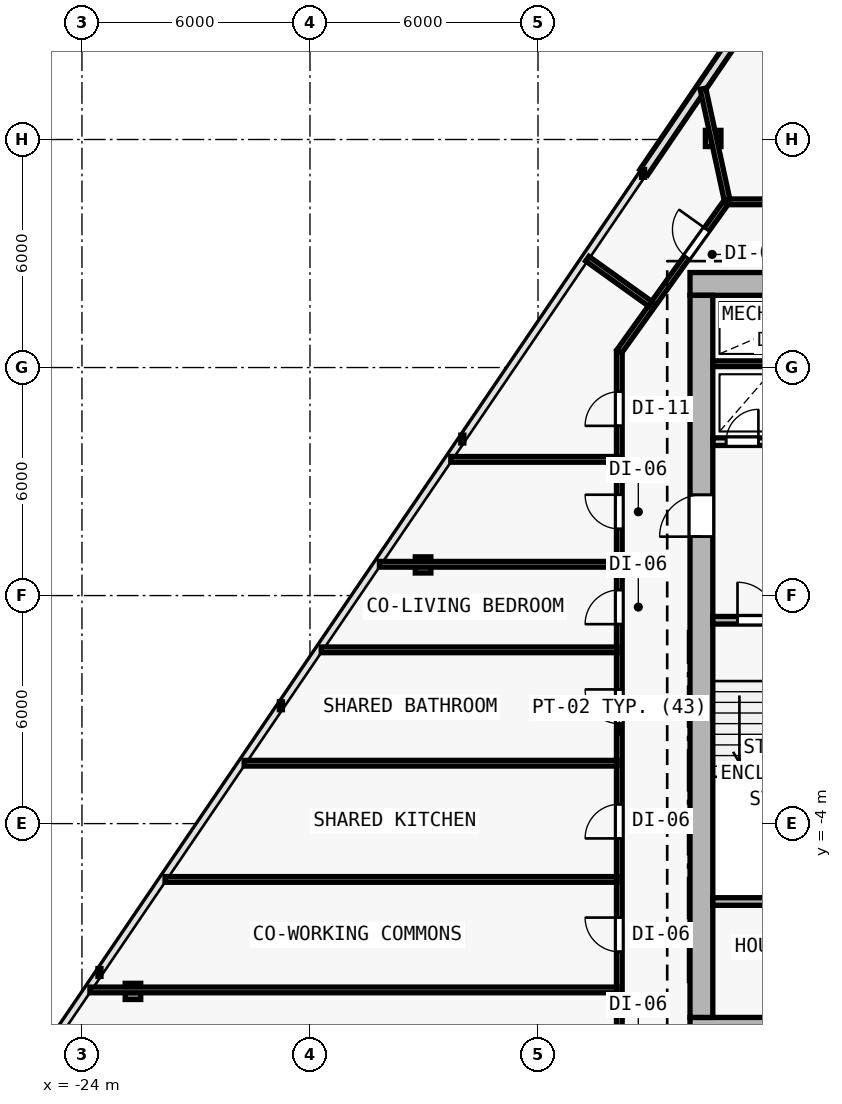
"""IFC4 building model, lengths in metres.
Left out: names, types, materials, properties, quantities, classifications, styles, units other than length and angle.
Written with IfcOpenShell. Run it as: python <this file> out.ifc"""

import sys

from ifc_helpers import new_model, si_unit, direction, frame, frame_2d, origin, origin_2d, place, context, subcontext, project, spatial, rectangle, i_section, extrude, element, fill, save


model = new_model("IFC4")
c1 = context("Model", 3, precision=1e-05, world=origin(), true_north=direction((0.0, 1.0)))
c2 = subcontext(c1, "Body", "Model", "MODEL_VIEW")
j1 = project(units=[si_unit("LENGTHUNIT", "METRE"), si_unit("PLANEANGLEUNIT", "RADIAN")], contexts=[c1])
p1 = place(None, origin())
s1 = spatial("IfcSite", under=j1, at=p1, CompositionType="ELEMENT")
p2 = place(p1, origin())
s2 = spatial("IfcBuilding", under=s1, at=p2, CompositionType="ELEMENT")
p3 = place(p2, frame((0.0, 0.0, 96.9)))
s3 = spatial("IfcBuildingStorey", under=s2, at=p3, CompositionType="ELEMENT", Elevation=96.9)
for number, where, z_axis, x_axis in (
    (1, (-7.7, -9.4, 0.0), (0.0, 0.0, 1.0), (1.0, 0.0, 0.0)),
    (2, (-7.7, 10.2, 0.0), (0.0, 0.0, 1.0), (1.0, 0.0, 0.0)),
    (3, (-7.7, 2.0, 0.0), (0.0, 0.0, 1.0), (1.0, 0.0, 0.0)),
):
    element("IfcColumn", number, at=place(p3, frame(where, z_axis=z_axis, x_axis=x_axis)), inside=s3, PredefinedType="COLUMN", context=c2, shape_type="SweptSolid", body=[
        extrude(i_section(OverallWidth=0.409, OverallDepth=0.425, WebThickness=0.021, FlangeThickness=0.034, FilletRadius=0.015, at=origin_2d()), origin(), (0.0, 0.0, 1.0), 3.6),
    ])
p4 = place(p3, frame((-7.39, 14.028, 0.006), z_axis=(0.008843163607, -0.002516900411, 0.999957730942), x_axis=(0.273743828055, 0.961802639112, 0.0)))
e4 = element("IfcColumn", 4, at=p4, inside=s3, PredefinedType="COLUMN", context=c2, shape_type="SweptSolid", body=[
    extrude(i_section(OverallWidth=0.409, OverallDepth=0.425, WebThickness=0.021, FlangeThickness=0.034, FilletRadius=0.015, at=origin_2d()), origin(), (0.0, 0.0, 1.0), 3.589),
])
p5 = place(p3, frame((-15.024, 2.806, 0.006), z_axis=(0.017071567417, 0.009521989794, 0.999808928394), x_axis=(-0.487119351792, 0.873335409284, 0.0)))
e5 = element("IfcColumn", 5, at=p5, inside=s3, PredefinedType="COLUMN", context=c2, shape_type="SweptSolid", body=[
    extrude(i_section(OverallWidth=0.409, OverallDepth=0.425, WebThickness=0.021, FlangeThickness=0.034, FilletRadius=0.015, at=origin_2d()), origin(), (0.0, 0.0, 1.0), 3.59),
])
p6 = place(p3, frame((-22.658, -8.415, 0.006), z_axis=(0.025292109804, 0.02162067451, 0.999446274502), x_axis=(-0.649781149204, 0.760121344352, 0.0)))
e6 = element("IfcColumn", 6, at=p6, inside=s3, PredefinedType="COLUMN", context=c2, shape_type="SweptSolid", body=[
    extrude(i_section(OverallWidth=0.409, OverallDepth=0.425, WebThickness=0.021, FlangeThickness=0.034, FilletRadius=0.015, at=origin_2d()), origin(), (0.0, 0.0, 1.0), 3.591),
])
p7 = place(p3, frame((-9.217, 13.136, 0.0), z_axis=(0.0, 0.0, 1.0), x_axis=(0.562468998305, 0.826818375428, 0.0)))
e7 = element("IfcWall", 7, at=p7, inside=s3, PredefinedType="SOLIDWALL", context=c2, shape_type="SweptSolid", body=[
    extrude(rectangle(XDim=11.929, YDim=0.25, at=frame_2d((5.964, 0.0))), origin(), (0.0, 0.0, 1.0), 3.35),
])
p8 = place(p7, frame((5.364, 0.0, 0.62)))
e8 = element("IfcOpeningElement", 8, at=p8, cuts=e7, PredefinedType="OPENING", context=c2, shape_type="SweptSolid", body=[
    extrude(rectangle(XDim=1.2, YDim=1.8, at=frame_2d((0.6, 0.9))), frame((0.0, 0.135, 0.0), z_axis=(0.0, -1.0, 0.0), x_axis=(1.0, 0.0, 0.0)), (0.0, 0.0, 1.0), 0.27),
])
p9 = place(p3, frame((-8.0, -9.4, 0.0), z_axis=(0.0, 0.0, 1.0), x_axis=(1.0, 0.0, 0.0)))
e9 = element("IfcWall", 9, at=p9, inside=s3, PredefinedType="SHEAR", context=c2, shape_type="SweptSolid", body=[
    extrude(rectangle(XDim=16.0, YDim=0.6, at=frame_2d((8.0, 0.0))), origin(), (0.0, 0.0, 1.0), 3.35),
])
p10 = place(p9, frame((9.65, 0.0, 0.0)))
e10 = element("IfcOpeningElement", 10, at=p10, cuts=e9, PredefinedType="OPENING", context=c2, shape_type="SweptSolid", body=[
    extrude(rectangle(XDim=1.5, YDim=2.2, at=frame_2d((0.75, 1.1))), frame((0.0, 0.31, 0.0), z_axis=(0.0, -1.0, 0.0), x_axis=(1.0, 0.0, 0.0)), (0.0, 0.0, 1.0), 0.62),
])
p11 = place(p3, frame((8.0, 10.2, 0.0), z_axis=(0.0, 0.0, 1.0), x_axis=(-1.0, 0.0, 0.0)))
e11 = element("IfcWall", 11, at=p11, inside=s3, PredefinedType="SHEAR", context=c2, shape_type="SweptSolid", body=[
    extrude(rectangle(XDim=16.0, YDim=0.6, at=frame_2d((8.0, 0.0))), origin(), (0.0, 0.0, 1.0), 3.35),
])
p12 = place(p11, frame((4.45, 0.0, 0.0)))
e12 = element("IfcOpeningElement", 12, at=p12, cuts=e11, PredefinedType="OPENING", context=c2, shape_type="SweptSolid", body=[
    extrude(rectangle(XDim=1.1, YDim=2.15, at=frame_2d((0.55, 1.075))), frame((0.0, 0.31, 0.0), z_axis=(0.0, -1.0, 0.0), x_axis=(1.0, 0.0, 0.0)), (0.0, 0.0, 1.0), 0.62),
])
p13 = place(p3, frame((-7.7, -9.1, 0.0), z_axis=(0.0, 0.0, 1.0), x_axis=(0.0, 1.0, 0.0)))
e13 = element("IfcWall", 13, at=p13, inside=s3, PredefinedType="SHEAR", context=c2, shape_type="SweptSolid", body=[
    extrude(rectangle(XDim=19.0, YDim=0.6, at=frame_2d((9.5, 0.0))), origin(), (0.0, 0.0, 1.0), 3.35),
])
p14 = place(p13, frame((12.65, 0.0, 0.0)))
e14 = element("IfcOpeningElement", 14, at=p14, cuts=e13, PredefinedType="OPENING", context=c2, shape_type="SweptSolid", body=[
    extrude(rectangle(XDim=1.1, YDim=2.15, at=frame_2d((0.55, 1.075))), frame((0.0, 0.31, 0.0), z_axis=(0.0, -1.0, 0.0), x_axis=(1.0, 0.0, 0.0)), (0.0, 0.0, 1.0), 0.62),
])
p15 = place(p3, frame((-7.4, 1.35, 0.0), z_axis=(0.0, 0.0, 1.0), x_axis=(1.0, 0.0, 0.0)))
e15 = element("IfcWall", 15, at=p15, inside=s3, PredefinedType="SOLIDWALL", context=c2, shape_type="SweptSolid", body=[
    extrude(rectangle(XDim=3.35, YDim=0.2, at=frame_2d((1.675, 0.0))), origin(), (0.0, 0.0, 1.0), 3.35),
])
p16 = place(p15, frame((0.65, 0.0, 0.0)))
e16 = element("IfcOpeningElement", 16, at=p16, cuts=e15, PredefinedType="OPENING", context=c2, shape_type="SweptSolid", body=[
    extrude(rectangle(XDim=1.0, YDim=2.15, at=frame_2d((0.5, 1.075))), frame((0.0, 0.11, 0.0), z_axis=(0.0, -1.0, 0.0), x_axis=(1.0, 0.0, 0.0)), (0.0, 0.0, 1.0), 0.22),
])
p17 = place(p3, frame((-7.395, 6.05, 0.0), z_axis=(0.0, 0.0, 1.0), x_axis=(1.0, 0.0, 0.0)))
e17 = element("IfcWall", 17, at=p17, inside=s3, PredefinedType="SOLIDWALL", context=c2, shape_type="SweptSolid", body=[
    extrude(rectangle(XDim=3.545, YDim=0.2, at=frame_2d((1.772, 0.0))), origin(), (0.0, 0.0, 1.0), 3.35),
])
p18 = place(p17, frame((0.345, 0.0, 0.0)))
e18 = element("IfcOpeningElement", 18, at=p18, cuts=e17, PredefinedType="OPENING", context=c2, shape_type="SweptSolid", body=[
    extrude(rectangle(XDim=0.85, YDim=2.1, at=frame_2d((0.425, 1.05))), frame((0.0, 0.11, 0.0), z_axis=(0.0, -1.0, 0.0), x_axis=(1.0, 0.0, 0.0)), (0.0, 0.0, 1.0), 0.22),
])
p19 = place(p17, frame((2.145, 0.0, 0.0)))
e19 = element("IfcOpeningElement", 19, at=p19, cuts=e17, PredefinedType="OPENING", context=c2, shape_type="SweptSolid", body=[
    extrude(rectangle(XDim=0.85, YDim=2.1, at=frame_2d((0.425, 1.05))), frame((0.0, 0.11, 0.0), z_axis=(0.0, -1.0, 0.0), x_axis=(1.0, 0.0, 0.0)), (0.0, 0.0, 1.0), 0.22),
])
p20 = place(p3, frame((-7.395, 8.1, 0.0), z_axis=(0.0, 0.0, 1.0), x_axis=(1.0, 0.0, 0.0)))
e20 = element("IfcWall", 20, at=p20, inside=s3, PredefinedType="PARTITIONING", context=c2, shape_type="SweptSolid", body=[
    extrude(rectangle(XDim=3.545, YDim=0.15, at=frame_2d((1.772, 0.0))), origin(), (0.0, 0.0, 1.0), 3.35),
])
p21 = place(p3, frame((-7.4, -6.05, 0.0), z_axis=(0.0, 0.0, 1.0), x_axis=(1.0, 0.0, 0.0)))
e21 = element("IfcWall", 21, at=p21, inside=s3, PredefinedType="SOLIDWALL", context=c2, shape_type="SweptSolid", body=[
    extrude(rectangle(XDim=3.35, YDim=0.2, at=frame_2d((1.675, 0.0))), origin(), (0.0, 0.0, 1.0), 3.35),
])
p22 = place(p3, frame((-9.86, -11.56, 0.0), z_axis=(0.0, 0.0, 1.0), x_axis=(0.0, 1.0, 0.0)))
e22 = element("IfcWall", 22, at=p22, inside=s3, PredefinedType="PARTITIONING", context=c2, shape_type="SweptSolid", body=[
    extrude(rectangle(XDim=19.986, YDim=0.15, at=frame_2d((9.993, 0.0))), origin(), (0.0, 0.0, 1.0), 2.705),
])
p23 = place(p22, frame((10.19, 0.0, 0.0)))
e23 = element("IfcOpeningElement", 23, at=p23, cuts=e22, PredefinedType="OPENING", context=c2, shape_type="SweptSolid", body=[
    extrude(rectangle(XDim=0.9, YDim=2.1, at=frame_2d((0.45, 1.05))), frame((0.0, 0.085, 0.0), z_axis=(0.0, -1.0, 0.0), x_axis=(1.0, 0.0, 0.0)), (0.0, 0.0, 1.0), 0.17),
])
p24 = place(p22, frame((7.17, 0.0, 0.0)))
e24 = element("IfcOpeningElement", 24, at=p24, cuts=e22, PredefinedType="OPENING", context=c2, shape_type="SweptSolid", body=[
    extrude(rectangle(XDim=0.9, YDim=2.1, at=frame_2d((0.45, 1.05))), frame((0.0, 0.085, 0.0), z_axis=(0.0, -1.0, 0.0), x_axis=(1.0, 0.0, 0.0)), (0.0, 0.0, 1.0), 0.17),
])
p25 = place(p22, frame((4.187, 0.0, 0.0)))
e25 = element("IfcOpeningElement", 25, at=p25, cuts=e22, PredefinedType="OPENING", context=c2, shape_type="SweptSolid", body=[
    extrude(rectangle(XDim=0.9, YDim=2.1, at=frame_2d((0.45, 1.05))), frame((0.0, 0.085, 0.0), z_axis=(0.0, -1.0, 0.0), x_axis=(1.0, 0.0, 0.0)), (0.0, 0.0, 1.0), 0.17),
])
p26 = place(p22, frame((1.231, 0.0, 0.0)))
e26 = element("IfcOpeningElement", 26, at=p26, cuts=e22, PredefinedType="OPENING", context=c2, shape_type="SweptSolid", body=[
    extrude(rectangle(XDim=0.9, YDim=2.1, at=frame_2d((0.45, 1.05))), frame((0.0, 0.085, 0.0), z_axis=(0.0, -1.0, 0.0), x_axis=(1.0, 0.0, 0.0)), (0.0, 0.0, 1.0), 0.17),
])
p27 = place(p22, frame((18.026, 0.0, 0.0)))
e27 = element("IfcOpeningElement", 27, at=p27, cuts=e22, PredefinedType="OPENING", context=c2, shape_type="SweptSolid", body=[
    extrude(rectangle(XDim=0.9, YDim=2.1, at=frame_2d((0.45, 1.05))), frame((0.0, 0.085, 0.0), z_axis=(0.0, -1.0, 0.0), x_axis=(1.0, 0.0, 0.0)), (0.0, 0.0, 1.0), 0.17),
])
p28 = place(p22, frame((15.313, 0.0, 0.0)))
e28 = element("IfcOpeningElement", 28, at=p28, cuts=e22, PredefinedType="OPENING", context=c2, shape_type="SweptSolid", body=[
    extrude(rectangle(XDim=0.9, YDim=2.1, at=frame_2d((0.45, 1.05))), frame((0.0, 0.085, 0.0), z_axis=(0.0, -1.0, 0.0), x_axis=(1.0, 0.0, 0.0)), (0.0, 0.0, 1.0), 0.17),
])
p29 = place(p22, frame((12.808, 0.0, 0.0)))
e29 = element("IfcOpeningElement", 29, at=p29, cuts=e22, PredefinedType="OPENING", context=c2, shape_type="SweptSolid", body=[
    extrude(rectangle(XDim=0.9, YDim=2.1, at=frame_2d((0.45, 1.05))), frame((0.0, 0.085, 0.0), z_axis=(0.0, -1.0, 0.0), x_axis=(1.0, 0.0, 0.0)), (0.0, 0.0, 1.0), 0.17),
])
p30 = place(p3, frame((-9.86, 8.426, 0.0), z_axis=(0.0, 0.0, 1.0), x_axis=(0.582449511476, 0.812866881218, 0.0)))
e30 = element("IfcWall", 30, at=p30, inside=s3, PredefinedType="PARTITIONING", context=c2, shape_type="SweptSolid", body=[
    extrude(rectangle(XDim=4.84, YDim=0.15, at=frame_2d((2.42, 0.0))), origin(), (0.0, 0.0, 1.0), 2.925),
])
p31 = place(p30, frame((3.046, 0.0, 0.0)))
e31 = element("IfcOpeningElement", 31, at=p31, cuts=e30, PredefinedType="OPENING", context=c2, shape_type="SweptSolid", body=[
    extrude(rectangle(XDim=0.9, YDim=2.1, at=frame_2d((0.45, 1.05))), frame((0.0, 0.085, 0.0), z_axis=(0.0, -1.0, 0.0), x_axis=(1.0, 0.0, 0.0)), (0.0, 0.0, 1.0), 0.17),
])
p32 = place(p3, frame((-7.041, 12.36, 0.0), z_axis=(0.0, 0.0, 1.0), x_axis=(1.0, 0.0, 0.0)))
e32 = element("IfcWall", 32, at=p32, inside=s3, PredefinedType="PARTITIONING", context=c2, shape_type="SweptSolid", body=[
    extrude(rectangle(XDim=14.082, YDim=0.15, at=frame_2d((7.041, 0.0))), origin(), (0.0, 0.0, 1.0), 3.35),
])
p33 = place(p32, frame((4.28, 0.0, 0.0)))
e33 = element("IfcOpeningElement", 33, at=p33, cuts=e32, PredefinedType="OPENING", context=c2, shape_type="SweptSolid", body=[
    extrude(rectangle(XDim=0.9, YDim=2.1, at=frame_2d((0.45, 1.05))), frame((0.0, 0.085, 0.0), z_axis=(0.0, -1.0, 0.0), x_axis=(1.0, 0.0, 0.0)), (0.0, 0.0, 1.0), 0.17),
])
p34 = place(p3, frame((-7.026, 12.417, 0.0), z_axis=(0.0, 0.0, 1.0), x_axis=(-0.211883427843, 0.977294946782, 0.0)))
e34 = element("IfcWall", 34, at=p34, inside=s3, PredefinedType="PARTITIONING", context=c2, shape_type="SweptSolid", body=[
    extrude(rectangle(XDim=2.988, YDim=0.15, at=frame_2d((1.494, 0.0))), origin(), (0.0, 0.0, 1.0), 2.835),
])
p35 = place(p3, frame((-9.92, 2.823, 0.0), z_axis=(0.0, 0.0, 1.0), x_axis=(-1.0, 0.0, 0.0)))
e35 = element("IfcWall", 35, at=p35, inside=s3, PredefinedType="PARTITIONING", context=c2, shape_type="SweptSolid", body=[
    extrude(rectangle(XDim=6.252, YDim=0.15, at=frame_2d((3.126, 0.0))), origin(), (0.0, 0.0, 1.0), 2.835),
])
p36 = place(p3, frame((-9.92, -8.376, 0.0), z_axis=(0.0, 0.0, 1.0), x_axis=(-1.0, 0.0, 0.0)))
e36 = element("IfcWall", 36, at=p36, inside=s3, PredefinedType="PARTITIONING", context=c2, shape_type="SweptSolid", body=[
    extrude(rectangle(XDim=13.871, YDim=0.15, at=frame_2d((6.936, 0.0))), origin(), (0.0, 0.0, 1.0), 2.705),
])
p37 = place(p3, frame((-9.92, -2.411, 0.0), z_axis=(0.0, 0.0, 1.0), x_axis=(-1.0, 0.0, 0.0)))
e37 = element("IfcWall", 37, at=p37, inside=s3, PredefinedType="PARTITIONING", context=c2, shape_type="SweptSolid", body=[
    extrude(rectangle(XDim=9.813, YDim=0.15, at=frame_2d((4.906, 0.0))), origin(), (0.0, 0.0, 1.0), 2.725),
])
p38 = place(p3, frame((-9.041, 9.673, 0.0), z_axis=(0.0, 0.0, 1.0), x_axis=(-0.812933955931, 0.582355890581, 0.0)))
e38 = element("IfcWall", 38, at=p38, inside=s3, PredefinedType="PARTITIONING", context=c2, shape_type="SweptSolid", body=[
    extrude(rectangle(XDim=2.045, YDim=0.15, at=frame_2d((1.022, 0.0))), origin(), (0.0, 0.0, 1.0), 2.835),
])
p39 = place(p3, frame((-9.92, 0.572, 0.0), z_axis=(0.0, 0.0, 1.0), x_axis=(-1.0, 0.0, 0.0)))
e39 = element("IfcWall", 39, at=p39, inside=s3, PredefinedType="PARTITIONING", context=c2, shape_type="SweptSolid", body=[
    extrude(rectangle(XDim=7.784, YDim=0.15, at=frame_2d((3.892, 0.0))), origin(), (0.0, 0.0, 1.0), 2.725),
])
p40 = place(p3, frame((-9.92, -5.469, 0.0), z_axis=(0.0, 0.0, 1.0), x_axis=(-1.0, 0.0, 0.0)))
e40 = element("IfcWall", 40, at=p40, inside=s3, PredefinedType="PARTITIONING", context=c2, shape_type="SweptSolid", body=[
    extrude(rectangle(XDim=11.894, YDim=0.15, at=frame_2d((5.947, 0.0))), origin(), (0.0, 0.0, 1.0), 2.725),
])
p41 = place(p3, frame((-9.92, 5.584, 0.0), z_axis=(0.0, 0.0, 1.0), x_axis=(-1.0, 0.0, 0.0)))
e41 = element("IfcWall", 41, at=p41, inside=s3, PredefinedType="PARTITIONING", context=c2, shape_type="SweptSolid", body=[
    extrude(rectangle(XDim=4.374, YDim=0.15, at=frame_2d((2.187, 0.0))), origin(), (0.0, 0.0, 1.0), 2.835),
])
p42 = place(p14, origin())
e42 = element("IfcDoor", 42, at=p42, inside=s3, OperationType="SINGLE_SWING_LEFT", PredefinedType="DOOR", context=c2, shape_type="SweptSolid", body=[
    extrude(rectangle(XDim=1.1, YDim=2.15, at=frame_2d((0.55, 1.075))), frame((0.0, 0.025, 0.0), z_axis=(0.0, -1.0, 0.0), x_axis=(1.0, 0.0, 0.0)), (0.0, 0.0, 1.0), 0.05),
])
fill(e14, e42)
p43 = place(p16, origin())
e43 = element("IfcDoor", 43, at=p43, inside=s3, OperationType="SINGLE_SWING_LEFT", PredefinedType="DOOR", context=c2, shape_type="SweptSolid", body=[
    extrude(rectangle(XDim=1.0, YDim=2.15, at=frame_2d((0.5, 1.075))), frame((0.0, 0.025, 0.0), z_axis=(0.0, -1.0, 0.0), x_axis=(1.0, 0.0, 0.0)), (0.0, 0.0, 1.0), 0.05),
])
fill(e16, e43)
p44 = place(p18, origin())
e44 = element("IfcDoor", 44, at=p44, inside=s3, OperationType="SINGLE_SWING_RIGHT", PredefinedType="DOOR", context=c2, shape_type="SweptSolid", body=[
    extrude(rectangle(XDim=0.85, YDim=2.1, at=frame_2d((0.425, 1.05))), frame((0.0, 0.025, 0.0), z_axis=(0.0, -1.0, 0.0), x_axis=(1.0, 0.0, 0.0)), (0.0, 0.0, 1.0), 0.05),
])
fill(e18, e44)
p45 = place(p23, origin())
e45 = element("IfcDoor", 45, at=p45, inside=s3, OperationType="SINGLE_SWING_RIGHT", PredefinedType="DOOR", context=c2, shape_type="SweptSolid", body=[
    extrude(rectangle(XDim=0.9, YDim=2.1, at=frame_2d((0.45, 1.05))), frame((0.0, 0.025, 0.0), z_axis=(0.0, -1.0, 0.0), x_axis=(1.0, 0.0, 0.0)), (0.0, 0.0, 1.0), 0.05),
])
fill(e23, e45)
p46 = place(p24, origin())
e46 = element("IfcDoor", 46, at=p46, inside=s3, OperationType="SINGLE_SWING_LEFT", PredefinedType="DOOR", context=c2, shape_type="SweptSolid", body=[
    extrude(rectangle(XDim=0.9, YDim=2.1, at=frame_2d((0.45, 1.05))), frame((0.0, 0.025, 0.0), z_axis=(0.0, -1.0, 0.0), x_axis=(1.0, 0.0, 0.0)), (0.0, 0.0, 1.0), 0.05),
])
fill(e24, e46)
p47 = place(p25, origin())
e47 = element("IfcDoor", 47, at=p47, inside=s3, OperationType="SINGLE_SWING_RIGHT", PredefinedType="DOOR", context=c2, shape_type="SweptSolid", body=[
    extrude(rectangle(XDim=0.9, YDim=2.1, at=frame_2d((0.45, 1.05))), frame((0.0, 0.025, 0.0), z_axis=(0.0, -1.0, 0.0), x_axis=(1.0, 0.0, 0.0)), (0.0, 0.0, 1.0), 0.05),
])
fill(e25, e47)
p48 = place(p31, origin())
e48 = element("IfcDoor", 48, at=p48, inside=s3, OperationType="SINGLE_SWING_RIGHT", PredefinedType="DOOR", context=c2, shape_type="SweptSolid", body=[
    extrude(rectangle(XDim=0.9, YDim=2.1, at=frame_2d((0.45, 1.05))), frame((0.0, 0.025, 0.0), z_axis=(0.0, -1.0, 0.0), x_axis=(1.0, 0.0, 0.0)), (0.0, 0.0, 1.0), 0.05),
])
fill(e31, e48)
p49 = place(p27, origin())
e49 = element("IfcDoor", 49, at=p49, inside=s3, OperationType="SINGLE_SWING_LEFT", PredefinedType="DOOR", context=c2, shape_type="SweptSolid", body=[
    extrude(rectangle(XDim=0.9, YDim=2.1, at=frame_2d((0.45, 1.05))), frame((0.0, 0.025, 0.0), z_axis=(0.0, -1.0, 0.0), x_axis=(1.0, 0.0, 0.0)), (0.0, 0.0, 1.0), 0.05),
])
fill(e27, e49)
p50 = place(p28, origin())
e50 = element("IfcDoor", 50, at=p50, inside=s3, OperationType="SINGLE_SWING_RIGHT", PredefinedType="DOOR", context=c2, shape_type="SweptSolid", body=[
    extrude(rectangle(XDim=0.9, YDim=2.1, at=frame_2d((0.45, 1.05))), frame((0.0, 0.025, 0.0), z_axis=(0.0, -1.0, 0.0), x_axis=(1.0, 0.0, 0.0)), (0.0, 0.0, 1.0), 0.05),
])
fill(e28, e50)
p51 = place(p29, origin())
e51 = element("IfcDoor", 51, at=p51, inside=s3, OperationType="SINGLE_SWING_LEFT", PredefinedType="DOOR", context=c2, shape_type="SweptSolid", body=[
    extrude(rectangle(XDim=0.9, YDim=2.1, at=frame_2d((0.45, 1.05))), frame((0.0, 0.025, 0.0), z_axis=(0.0, -1.0, 0.0), x_axis=(1.0, 0.0, 0.0)), (0.0, 0.0, 1.0), 0.05),
])
fill(e29, e51)
save(model, sys.argv[1])
